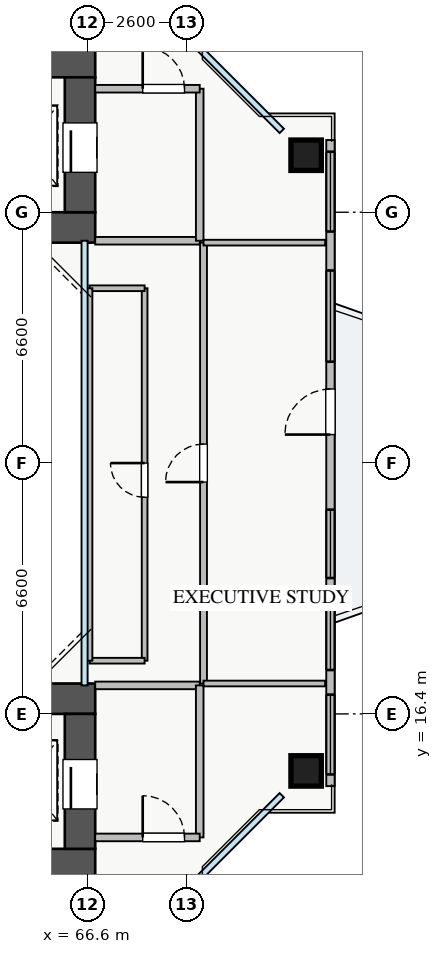
"""IFC4 building model, lengths in metres.
Left out: names, types, materials, properties, quantities, classifications, styles, units other than length and angle.
Written with IfcOpenShell. Run it as: python <this file> out.ifc"""

import sys

from ifc_helpers import new_model, si_unit, direction, frame, frame_2d, origin, origin_2d, place, context, subcontext, project, spatial, rectangle, extrude, source, transform, mapped, element, fill, save


model = new_model("IFC4")
c1 = context("Model", 3, precision=1e-05, world=origin(), true_north=direction((0.0, 1.0)))
c2 = subcontext(c1, "Body", "Model", "MODEL_VIEW")
j1 = project(units=[si_unit("LENGTHUNIT", "METRE"), si_unit("PLANEANGLEUNIT", "RADIAN")], contexts=[c1])
p1 = place(None, origin())
s1 = spatial("IfcSite", under=j1, at=p1, CompositionType="ELEMENT")
p2 = place(p1, origin())
s2 = spatial("IfcBuilding", under=s1, at=p2, CompositionType="ELEMENT")
p3 = place(p2, frame((0.0, 0.0, 89.25)))
s3 = spatial("IfcBuildingStorey", under=s2, at=p3, CompositionType="ELEMENT", Elevation=89.25)
p4 = place(p3, frame((54.2, 29.2, 0.0), z_axis=(0.0, 0.0, 1.0), x_axis=(1.0, 0.0, 0.0)))
e1 = element("IfcWall", 1, at=p4, inside=s3, PredefinedType="SHEAR", context=c2, shape_type="SweptSolid", body=[
    extrude(rectangle(XDim=12.6, YDim=0.8, at=frame_2d((6.3, 0.0))), origin(), (0.0, 0.0, 1.0), 3.25),
])
p5 = place(p3, frame((54.2, 33.55, 0.0), z_axis=(0.0, 0.0, 1.0), x_axis=(1.0, 0.0, 0.0)))
e2 = element("IfcWall", 2, at=p5, inside=s3, PredefinedType="SHEAR", context=c2, shape_type="SweptSolid", body=[
    extrude(rectangle(XDim=12.6, YDim=0.8, at=frame_2d((6.3, 0.0))), origin(), (0.0, 0.0, 1.0), 3.25),
])
p6 = place(p5, frame((8.2, 0.0, 0.0)))
e3 = element("IfcOpeningElement", 3, at=p6, cuts=e2, PredefinedType="OPENING", context=c2, shape_type="SweptSolid", body=[
    extrude(rectangle(XDim=1.1, YDim=2.05, at=frame_2d((0.55, 1.025))), frame((0.0, 0.41, 0.0), z_axis=(0.0, -1.0, 0.0), x_axis=(1.0, 0.0, 0.0)), (0.0, 0.0, 1.0), 0.82),
])
p7 = place(p3, frame((66.4, 29.6, 0.0), z_axis=(0.0, 0.0, 1.0), x_axis=(0.0, 1.0, 0.0)))
e4 = element("IfcWall", 4, at=p7, inside=s3, PredefinedType="SHEAR", context=c2, shape_type="SweptSolid", body=[
    extrude(rectangle(XDim=3.55, YDim=0.8, at=frame_2d((1.775, 0.0))), origin(), (0.0, 0.0, 1.0), 3.25),
])
p8 = place(p7, frame((1.05, 0.0, 0.0)))
e5 = element("IfcOpeningElement", 5, at=p8, cuts=e4, PredefinedType="OPENING", context=c2, shape_type="SweptSolid", body=[
    extrude(rectangle(XDim=1.3, YDim=2.05, at=frame_2d((0.65, 1.025))), frame((0.0, 0.41, 0.0), z_axis=(0.0, -1.0, 0.0), x_axis=(1.0, 0.0, 0.0)), (0.0, 0.0, 1.0), 0.82),
])
p9 = place(p3, frame((54.2, 12.45, 0.0), z_axis=(0.0, 0.0, 1.0), x_axis=(1.0, 0.0, 0.0)))
e6 = element("IfcWall", 6, at=p9, inside=s3, PredefinedType="SHEAR", context=c2, shape_type="SweptSolid", body=[
    extrude(rectangle(XDim=12.6, YDim=0.8, at=frame_2d((6.3, 0.0))), origin(), (0.0, 0.0, 1.0), 3.25),
])
p10 = place(p9, frame((8.2, 0.0, 0.0)))
e7 = element("IfcOpeningElement", 7, at=p10, cuts=e6, PredefinedType="OPENING", context=c2, shape_type="SweptSolid", body=[
    extrude(rectangle(XDim=1.1, YDim=2.05, at=frame_2d((0.55, 1.025))), frame((0.0, 0.41, 0.0), z_axis=(0.0, -1.0, 0.0), x_axis=(1.0, 0.0, 0.0)), (0.0, 0.0, 1.0), 0.82),
])
p11 = place(p3, frame((54.2, 16.8, 0.0), z_axis=(0.0, 0.0, 1.0), x_axis=(1.0, 0.0, 0.0)))
e8 = element("IfcWall", 8, at=p11, inside=s3, PredefinedType="SHEAR", context=c2, shape_type="SweptSolid", body=[
    extrude(rectangle(XDim=12.6, YDim=0.8, at=frame_2d((6.3, 0.0))), origin(), (0.0, 0.0, 1.0), 3.25),
])
p12 = place(p3, frame((66.4, 12.85, 0.0), z_axis=(0.0, 0.0, 1.0), x_axis=(0.0, 1.0, 0.0)))
e9 = element("IfcWall", 9, at=p12, inside=s3, PredefinedType="SHEAR", context=c2, shape_type="SweptSolid", body=[
    extrude(rectangle(XDim=3.55, YDim=0.8, at=frame_2d((1.775, 0.0))), origin(), (0.0, 0.0, 1.0), 3.25),
])
p13 = place(p12, frame((1.05, 0.0, 0.0)))
e10 = element("IfcOpeningElement", 10, at=p13, cuts=e9, PredefinedType="OPENING", context=c2, shape_type="SweptSolid", body=[
    extrude(rectangle(XDim=1.3, YDim=2.05, at=frame_2d((0.65, 1.025))), frame((0.0, 0.41, 0.0), z_axis=(0.0, -1.0, 0.0), x_axis=(1.0, 0.0, 0.0)), (0.0, 0.0, 1.0), 0.82),
])
m1 = source(origin(), c2, "Body", "SweptSolid", [
    extrude(rectangle(XDim=0.8, YDim=0.8, at=origin_2d()), origin(), (0.0, 0.0, 1.0), 3.25),
])
for number, where, z_axis, x_axis in (
    (11, (72.35, 14.9, 0.0), (0.0, 0.0, 1.0), (1.0, 0.0, 0.0)),
    (12, (72.35, 31.1, 0.0), (0.0, 0.0, 1.0), (1.0, 0.0, 0.0)),
):
    element("IfcColumn", number, at=place(p3, frame(where, z_axis=z_axis, x_axis=x_axis)), inside=s3, PredefinedType="COLUMN", context=c2, shape_type="MappedRepresentation", body=[
        mapped(m1, transform((0.0, 0.0, 0.0), x_axis=(1.0, 0.0, 0.0), y_axis=(0.0, 1.0, 0.0), z_axis=(0.0, 0.0, 1.0), scale=1.0)),
    ])
p14 = place(p3, frame((72.99, 14.5, 0.0), z_axis=(0.0, 0.0, 1.0), x_axis=(0.0, 1.0, 0.0)))
e13 = element("IfcWall", 13, at=p14, inside=s3, PredefinedType="STANDARD", context=c2, shape_type="SweptSolid", body=[
    extrude(rectangle(XDim=17.0, YDim=0.22, at=frame_2d((8.5, 0.0))), origin(), (0.0, 0.0, 1.0), 2.57),
])
p15 = place(p14, frame((9.25, 0.0, 0.0)))
e14 = element("IfcOpeningElement", 14, at=p15, cuts=e13, PredefinedType="OPENING", context=c2, shape_type="SweptSolid", body=[
    extrude(rectangle(XDim=1.2, YDim=2.1, at=frame_2d((0.6, 1.05))), frame((0.0, 0.12, 0.0), z_axis=(0.0, -1.0, 0.0), x_axis=(1.0, 0.0, 0.0)), (0.0, 0.0, 1.0), 0.24),
])
p16 = place(p14, frame((0.308, 0.0, 0.9)))
e15 = element("IfcOpeningElement", 15, at=p16, cuts=e13, PredefinedType="OPENING", context=c2, shape_type="SweptSolid", body=[
    extrude(rectangle(XDim=2.1, YDim=1.5, at=frame_2d((1.05, 0.75))), frame((0.0, 0.12, 0.0), z_axis=(0.0, -1.0, 0.0), x_axis=(1.0, 0.0, 0.0)), (0.0, 0.0, 1.0), 0.24),
])
p17 = place(p14, frame((5.475, 0.0, 0.9)))
e16 = element("IfcOpeningElement", 16, at=p17, cuts=e13, PredefinedType="OPENING", context=c2, shape_type="SweptSolid", body=[
    extrude(rectangle(XDim=1.8, YDim=1.45, at=frame_2d((0.9, 0.725))), frame((0.0, 0.12, 0.0), z_axis=(0.0, -1.0, 0.0), x_axis=(1.0, 0.0, 0.0)), (0.0, 0.0, 1.0), 0.24),
])
p18 = place(p14, frame((14.593, 0.0, 0.9)))
e17 = element("IfcOpeningElement", 17, at=p18, cuts=e13, PredefinedType="OPENING", context=c2, shape_type="SweptSolid", body=[
    extrude(rectangle(XDim=2.1, YDim=1.5, at=frame_2d((1.05, 0.75))), frame((0.0, 0.12, 0.0), z_axis=(0.0, -1.0, 0.0), x_axis=(1.0, 0.0, 0.0)), (0.0, 0.0, 1.0), 0.24),
])
p19 = place(p14, frame((3.055, 0.0, 0.9)))
e18 = element("IfcOpeningElement", 18, at=p19, cuts=e13, PredefinedType="OPENING", context=c2, shape_type="SweptSolid", body=[
    extrude(rectangle(XDim=2.1, YDim=1.5, at=frame_2d((1.05, 0.75))), frame((0.0, 0.12, 0.0), z_axis=(0.0, -1.0, 0.0), x_axis=(1.0, 0.0, 0.0)), (0.0, 0.0, 1.0), 0.24),
])
p20 = place(p14, frame((11.167, 0.0, 0.9)))
e19 = element("IfcOpeningElement", 19, at=p20, cuts=e13, PredefinedType="OPENING", context=c2, shape_type="SweptSolid", body=[
    extrude(rectangle(XDim=2.4, YDim=1.5, at=frame_2d((1.2, 0.75))), frame((0.0, 0.12, 0.0), z_axis=(0.0, -1.0, 0.0), x_axis=(1.0, 0.0, 0.0)), (0.0, 0.0, 1.0), 0.24),
])
p21 = place(p3, frame((66.8, 28.85, 0.0), z_axis=(0.0, 0.0, 1.0), x_axis=(1.0, 0.0, 0.0)))
e20 = element("IfcWall", 20, at=p21, inside=s3, PredefinedType="PARTITIONING", context=c2, shape_type="SweptSolid", body=[
    extrude(rectangle(XDim=2.75, YDim=0.2, at=frame_2d((1.375, 0.0))), origin(), (0.0, 0.0, 1.0), 3.03),
])
p22 = place(p3, frame((69.55, 28.85, 0.0), z_axis=(0.0, 0.0, 1.0), x_axis=(0.0, 1.0, 0.0)))
e21 = element("IfcWall", 21, at=p22, inside=s3, PredefinedType="PARTITIONING", context=c2, shape_type="SweptSolid", body=[
    extrude(rectangle(XDim=4.0, YDim=0.2, at=frame_2d((2.0, 0.0))), origin(), (0.0, 0.0, 1.0), 3.03),
])
p23 = place(p3, frame((66.8, 32.85, 0.0), z_axis=(0.0, 0.0, 1.0), x_axis=(1.0, 0.0, 0.0)))
e22 = element("IfcWall", 22, at=p23, inside=s3, PredefinedType="PARTITIONING", context=c2, shape_type="SweptSolid", body=[
    extrude(rectangle(XDim=2.75, YDim=0.2, at=frame_2d((1.375, 0.0))), origin(), (0.0, 0.0, 1.0), 3.03),
])
p24 = place(p23, frame((1.25, 0.0, 0.0)))
e23 = element("IfcOpeningElement", 23, at=p24, cuts=e22, PredefinedType="OPENING", context=c2, shape_type="SweptSolid", body=[
    extrude(rectangle(XDim=1.1, YDim=2.05, at=frame_2d((0.55, 1.025))), frame((0.0, 0.11, 0.0), z_axis=(0.0, -1.0, 0.0), x_axis=(1.0, 0.0, 0.0)), (0.0, 0.0, 1.0), 0.22),
])
p25 = place(p3, frame((66.8, 17.15, 0.0), z_axis=(0.0, 0.0, 1.0), x_axis=(1.0, 0.0, 0.0)))
e24 = element("IfcWall", 24, at=p25, inside=s3, PredefinedType="PARTITIONING", context=c2, shape_type="SweptSolid", body=[
    extrude(rectangle(XDim=2.75, YDim=0.2, at=frame_2d((1.375, 0.0))), origin(), (0.0, 0.0, 1.0), 3.03),
])
p26 = place(p3, frame((69.55, 13.15, 0.0), z_axis=(0.0, 0.0, 1.0), x_axis=(0.0, 1.0, 0.0)))
e25 = element("IfcWall", 25, at=p26, inside=s3, PredefinedType="PARTITIONING", context=c2, shape_type="SweptSolid", body=[
    extrude(rectangle(XDim=4.0, YDim=0.2, at=frame_2d((2.0, 0.0))), origin(), (0.0, 0.0, 1.0), 3.03),
])
p27 = place(p3, frame((66.8, 13.15, 0.0), z_axis=(0.0, 0.0, 1.0), x_axis=(1.0, 0.0, 0.0)))
e26 = element("IfcWall", 26, at=p27, inside=s3, PredefinedType="PARTITIONING", context=c2, shape_type="SweptSolid", body=[
    extrude(rectangle(XDim=2.75, YDim=0.2, at=frame_2d((1.375, 0.0))), origin(), (0.0, 0.0, 1.0), 3.03),
])
p28 = place(p27, frame((1.25, 0.0, 0.0)))
e27 = element("IfcOpeningElement", 27, at=p28, cuts=e26, PredefinedType="OPENING", context=c2, shape_type="SweptSolid", body=[
    extrude(rectangle(XDim=1.1, YDim=2.05, at=frame_2d((0.55, 1.025))), frame((0.0, 0.11, 0.0), z_axis=(0.0, -1.0, 0.0), x_axis=(1.0, 0.0, 0.0)), (0.0, 0.0, 1.0), 0.22),
])
p29 = place(p3, frame((69.65, 17.2, 0.0), z_axis=(0.0, 0.0, 1.0), x_axis=(0.0, 1.0, 0.0)))
e28 = element("IfcWall", 28, at=p29, inside=s3, PredefinedType="PARTITIONING", context=c2, shape_type="SweptSolid", body=[
    extrude(rectangle(XDim=11.6, YDim=0.18, at=frame_2d((5.8, 0.0))), origin(), (0.0, 0.0, 1.0), 3.03),
])
p30 = place(p29, frame((5.3, 0.0, 0.0)))
e29 = element("IfcOpeningElement", 29, at=p30, cuts=e28, PredefinedType="OPENING", context=c2, shape_type="SweptSolid", body=[
    extrude(rectangle(XDim=1.0, YDim=2.05, at=frame_2d((0.5, 1.025))), frame((0.0, 0.1, 0.0), z_axis=(0.0, -1.0, 0.0), x_axis=(1.0, 0.0, 0.0)), (0.0, 0.0, 1.0), 0.2),
])
for number, where, z_axis, x_axis in (
    (30, (69.65, 17.2, 0.0), (0.0, 0.0, 1.0), (1.0, 0.0, 0.0)),
    (31, (69.65, 28.8, 0.0), (0.0, 0.0, 1.0), (1.0, 0.0, 0.0)),
):
    element("IfcWall", number, at=place(p3, frame(where, z_axis=z_axis, x_axis=x_axis)), inside=s3, PredefinedType="PARTITIONING", context=c2, shape_type="SweptSolid", body=[
        extrude(rectangle(XDim=3.2, YDim=0.15, at=frame_2d((1.6, 0.0))), origin(), (0.0, 0.0, 1.0), 3.03),
    ])
p31 = place(p3, frame((68.1, 17.8, 0.0), z_axis=(0.0, 0.0, 1.0), x_axis=(0.0, 1.0, 0.0)))
e32 = element("IfcWall", 32, at=p31, inside=s3, PredefinedType="PARTITIONING", context=c2, shape_type="SweptSolid", body=[
    extrude(rectangle(XDim=9.8, YDim=0.15, at=frame_2d((4.9, 0.0))), origin(), (0.0, 0.0, 1.0), 3.03),
])
p32 = place(p31, frame((4.3, 0.0, 0.0)))
e33 = element("IfcOpeningElement", 33, at=p32, cuts=e32, PredefinedType="OPENING", context=c2, shape_type="SweptSolid", body=[
    extrude(rectangle(XDim=0.9, YDim=2.05, at=frame_2d((0.45, 1.025))), frame((0.0, 0.085, 0.0), z_axis=(0.0, -1.0, 0.0), x_axis=(1.0, 0.0, 0.0)), (0.0, 0.0, 1.0), 0.17),
])
p33 = place(p3, frame((66.65, 27.6, 0.0), z_axis=(0.0, 0.0, 1.0), x_axis=(1.0, 0.0, 0.0)))
e34 = element("IfcWall", 34, at=p33, inside=s3, PredefinedType="PARTITIONING", context=c2, shape_type="SweptSolid", body=[
    extrude(rectangle(XDim=1.45, YDim=0.15, at=frame_2d((0.725, 0.0))), origin(), (0.0, 0.0, 1.0), 2.781),
])
p34 = place(p3, frame((66.65, 17.8, 0.0), z_axis=(0.0, 0.0, 1.0), x_axis=(1.0, 0.0, 0.0)))
e35 = element("IfcWall", 35, at=p34, inside=s3, PredefinedType="PARTITIONING", context=c2, shape_type="SweptSolid", body=[
    extrude(rectangle(XDim=1.45, YDim=0.15, at=frame_2d((0.725, 0.0))), origin(), (0.0, 0.0, 1.0), 3.03),
])
p35 = place(p3, frame((66.65, 17.8, 0.0), z_axis=(0.0, 0.0, 1.0), x_axis=(0.0, 1.0, 0.0)))
e36 = element("IfcWall", 36, at=p35, inside=s3, PredefinedType="PARTITIONING", context=c2, shape_type="SweptSolid", body=[
    extrude(rectangle(XDim=9.8, YDim=0.15, at=frame_2d((4.9, 0.0))), origin(), (0.0, 0.0, 1.0), 2.625),
])
m2 = source(origin(), c2, "Body", "SweptSolid", [
    extrude(rectangle(XDim=1.2, YDim=2.1, at=frame_2d((0.6, 1.05))), frame((0.0, 0.025, 0.0), z_axis=(0.0, -1.0, 0.0), x_axis=(1.0, 0.0, 0.0)), (0.0, 0.0, 1.0), 0.05),
])
p36 = place(p15, origin())
e37 = element("IfcDoor", 37, at=p36, inside=s3, OperationType="SINGLE_SWING_LEFT", PredefinedType="DOOR", context=c2, shape_type="MappedRepresentation", body=[
    mapped(m2, transform((0.0, 0.0, 0.0), x_axis=(1.0, 0.0, 0.0), y_axis=(0.0, 1.0, 0.0), z_axis=(0.0, 0.0, 1.0), scale=1.0)),
])
fill(e14, e37)
m3 = source(origin(), c2, "Body", "SweptSolid", [
    extrude(rectangle(XDim=2.1, YDim=1.5, at=frame_2d((1.05, 0.75))), frame((0.0, 0.03, 0.0), z_axis=(0.0, -1.0, 0.0), x_axis=(1.0, 0.0, 0.0)), (0.0, 0.0, 1.0), 0.06),
])
p37 = place(p16, origin())
e38 = element("IfcWindow", 38, at=p37, inside=s3, PartitioningType="TRIPLE_PANEL_VERTICAL", PredefinedType="WINDOW", context=c2, shape_type="MappedRepresentation", body=[
    mapped(m3, transform((0.0, 0.0, 0.0), x_axis=(1.0, 0.0, 0.0), y_axis=(0.0, 1.0, 0.0), z_axis=(0.0, 0.0, 1.0), scale=1.0)),
])
fill(e15, e38)
m4 = source(origin(), c2, "Body", "SweptSolid", [
    extrude(rectangle(XDim=1.8, YDim=1.45, at=frame_2d((0.9, 0.725))), frame((0.0, 0.03, 0.0), z_axis=(0.0, -1.0, 0.0), x_axis=(1.0, 0.0, 0.0)), (0.0, 0.0, 1.0), 0.06),
])
p38 = place(p17, origin())
e39 = element("IfcWindow", 39, at=p38, inside=s3, PartitioningType="DOUBLE_PANEL_VERTICAL", PredefinedType="WINDOW", context=c2, shape_type="MappedRepresentation", body=[
    mapped(m4, transform((0.0, 0.0, 0.0), x_axis=(1.0, 0.0, 0.0), y_axis=(0.0, 1.0, 0.0), z_axis=(0.0, 0.0, 1.0), scale=1.0)),
])
fill(e16, e39)
p39 = place(p18, origin())
e40 = element("IfcWindow", 40, at=p39, inside=s3, PartitioningType="TRIPLE_PANEL_VERTICAL", PredefinedType="WINDOW", context=c2, shape_type="MappedRepresentation", body=[
    mapped(m3, transform((0.0, 0.0, 0.0), x_axis=(1.0, 0.0, 0.0), y_axis=(0.0, 1.0, 0.0), z_axis=(0.0, 0.0, 1.0), scale=1.0)),
])
fill(e17, e40)
m5 = source(origin(), c2, "Body", "SweptSolid", [
    extrude(rectangle(XDim=1.3, YDim=2.05, at=frame_2d((0.65, 1.025))), frame((0.0, 0.025, 0.0), z_axis=(0.0, -1.0, 0.0), x_axis=(1.0, 0.0, 0.0)), (0.0, 0.0, 1.0), 0.05),
])
p40 = place(p8, origin())
e41 = element("IfcDoor", 41, at=p40, inside=s3, OperationType="SLIDING_TO_LEFT", PredefinedType="DOOR", context=c2, shape_type="MappedRepresentation", body=[
    mapped(m5, transform((0.0, 0.0, 0.0), x_axis=(1.0, 0.0, 0.0), y_axis=(0.0, 1.0, 0.0), z_axis=(0.0, 0.0, 1.0), scale=1.0)),
])
fill(e5, e41)
p41 = place(p13, origin())
e42 = element("IfcDoor", 42, at=p41, inside=s3, OperationType="SLIDING_TO_RIGHT", PredefinedType="DOOR", context=c2, shape_type="MappedRepresentation", body=[
    mapped(m5, transform((0.0, 0.0, 0.0), x_axis=(1.0, 0.0, 0.0), y_axis=(0.0, 1.0, 0.0), z_axis=(0.0, 0.0, 1.0), scale=1.0)),
])
fill(e10, e42)
m6 = source(origin(), c2, "Body", "SweptSolid", [
    extrude(rectangle(XDim=1.1, YDim=2.05, at=frame_2d((0.55, 1.025))), frame((0.0, 0.025, 0.0), z_axis=(0.0, -1.0, 0.0), x_axis=(1.0, 0.0, 0.0)), (0.0, 0.0, 1.0), 0.05),
])
p42 = place(p24, origin())
e43 = element("IfcDoor", 43, at=p42, inside=s3, OperationType="SINGLE_SWING_LEFT", PredefinedType="DOOR", context=c2, shape_type="MappedRepresentation", body=[
    mapped(m6, transform((0.0, 0.0, 0.0), x_axis=(1.0, 0.0, 0.0), y_axis=(0.0, 1.0, 0.0), z_axis=(0.0, 0.0, 1.0), scale=1.0)),
])
fill(e23, e43)
p43 = place(p28, origin())
e44 = element("IfcDoor", 44, at=p43, inside=s3, OperationType="SINGLE_SWING_LEFT", PredefinedType="DOOR", context=c2, shape_type="MappedRepresentation", body=[
    mapped(m6, transform((0.0, 0.0, 0.0), x_axis=(1.0, 0.0, 0.0), y_axis=(0.0, 1.0, 0.0), z_axis=(0.0, 0.0, 1.0), scale=1.0)),
])
fill(e27, e44)
m7 = source(origin(), c2, "Body", "SweptSolid", [
    extrude(rectangle(XDim=1.0, YDim=2.05, at=frame_2d((0.5, 1.025))), frame((0.0, 0.025, 0.0), z_axis=(0.0, -1.0, 0.0), x_axis=(1.0, 0.0, 0.0)), (0.0, 0.0, 1.0), 0.05),
])
p44 = place(p30, origin())
e45 = element("IfcDoor", 45, at=p44, inside=s3, OperationType="SINGLE_SWING_LEFT", PredefinedType="DOOR", context=c2, shape_type="MappedRepresentation", body=[
    mapped(m7, transform((0.0, 0.0, 0.0), x_axis=(1.0, 0.0, 0.0), y_axis=(0.0, 1.0, 0.0), z_axis=(0.0, 0.0, 1.0), scale=1.0)),
])
fill(e29, e45)
m8 = source(origin(), c2, "Body", "SweptSolid", [
    extrude(rectangle(XDim=0.9, YDim=2.05, at=frame_2d((0.45, 1.025))), frame((0.0, 0.025, 0.0), z_axis=(0.0, -1.0, 0.0), x_axis=(1.0, 0.0, 0.0)), (0.0, 0.0, 1.0), 0.05),
])
p45 = place(p32, origin())
e46 = element("IfcDoor", 46, at=p45, inside=s3, OperationType="SINGLE_SWING_RIGHT", PredefinedType="DOOR", context=c2, shape_type="MappedRepresentation", body=[
    mapped(m8, transform((0.0, 0.0, 0.0), x_axis=(1.0, 0.0, 0.0), y_axis=(0.0, 1.0, 0.0), z_axis=(0.0, 0.0, 1.0), scale=1.0)),
])
fill(e33, e46)
p46 = place(p19, origin())
e47 = element("IfcWindow", 47, at=p46, inside=s3, PartitioningType="TRIPLE_PANEL_VERTICAL", PredefinedType="WINDOW", context=c2, shape_type="MappedRepresentation", body=[
    mapped(m3, transform((0.0, 0.0, 0.0), x_axis=(1.0, 0.0, 0.0), y_axis=(0.0, 1.0, 0.0), z_axis=(0.0, 0.0, 1.0), scale=1.0)),
])
fill(e18, e47)
m9 = source(origin(), c2, "Body", "SweptSolid", [
    extrude(rectangle(XDim=2.4, YDim=1.5, at=frame_2d((1.2, 0.75))), frame((0.0, 0.03, 0.0), z_axis=(0.0, -1.0, 0.0), x_axis=(1.0, 0.0, 0.0)), (0.0, 0.0, 1.0), 0.06),
])
p47 = place(p20, origin())
e48 = element("IfcWindow", 48, at=p47, inside=s3, PartitioningType="TRIPLE_PANEL_VERTICAL", PredefinedType="WINDOW", context=c2, shape_type="MappedRepresentation", body=[
    mapped(m9, transform((0.0, 0.0, 0.0), x_axis=(1.0, 0.0, 0.0), y_axis=(0.0, 1.0, 0.0), z_axis=(0.0, 0.0, 1.0), scale=1.0)),
])
fill(e19, e48)
save(model, sys.argv[1])
